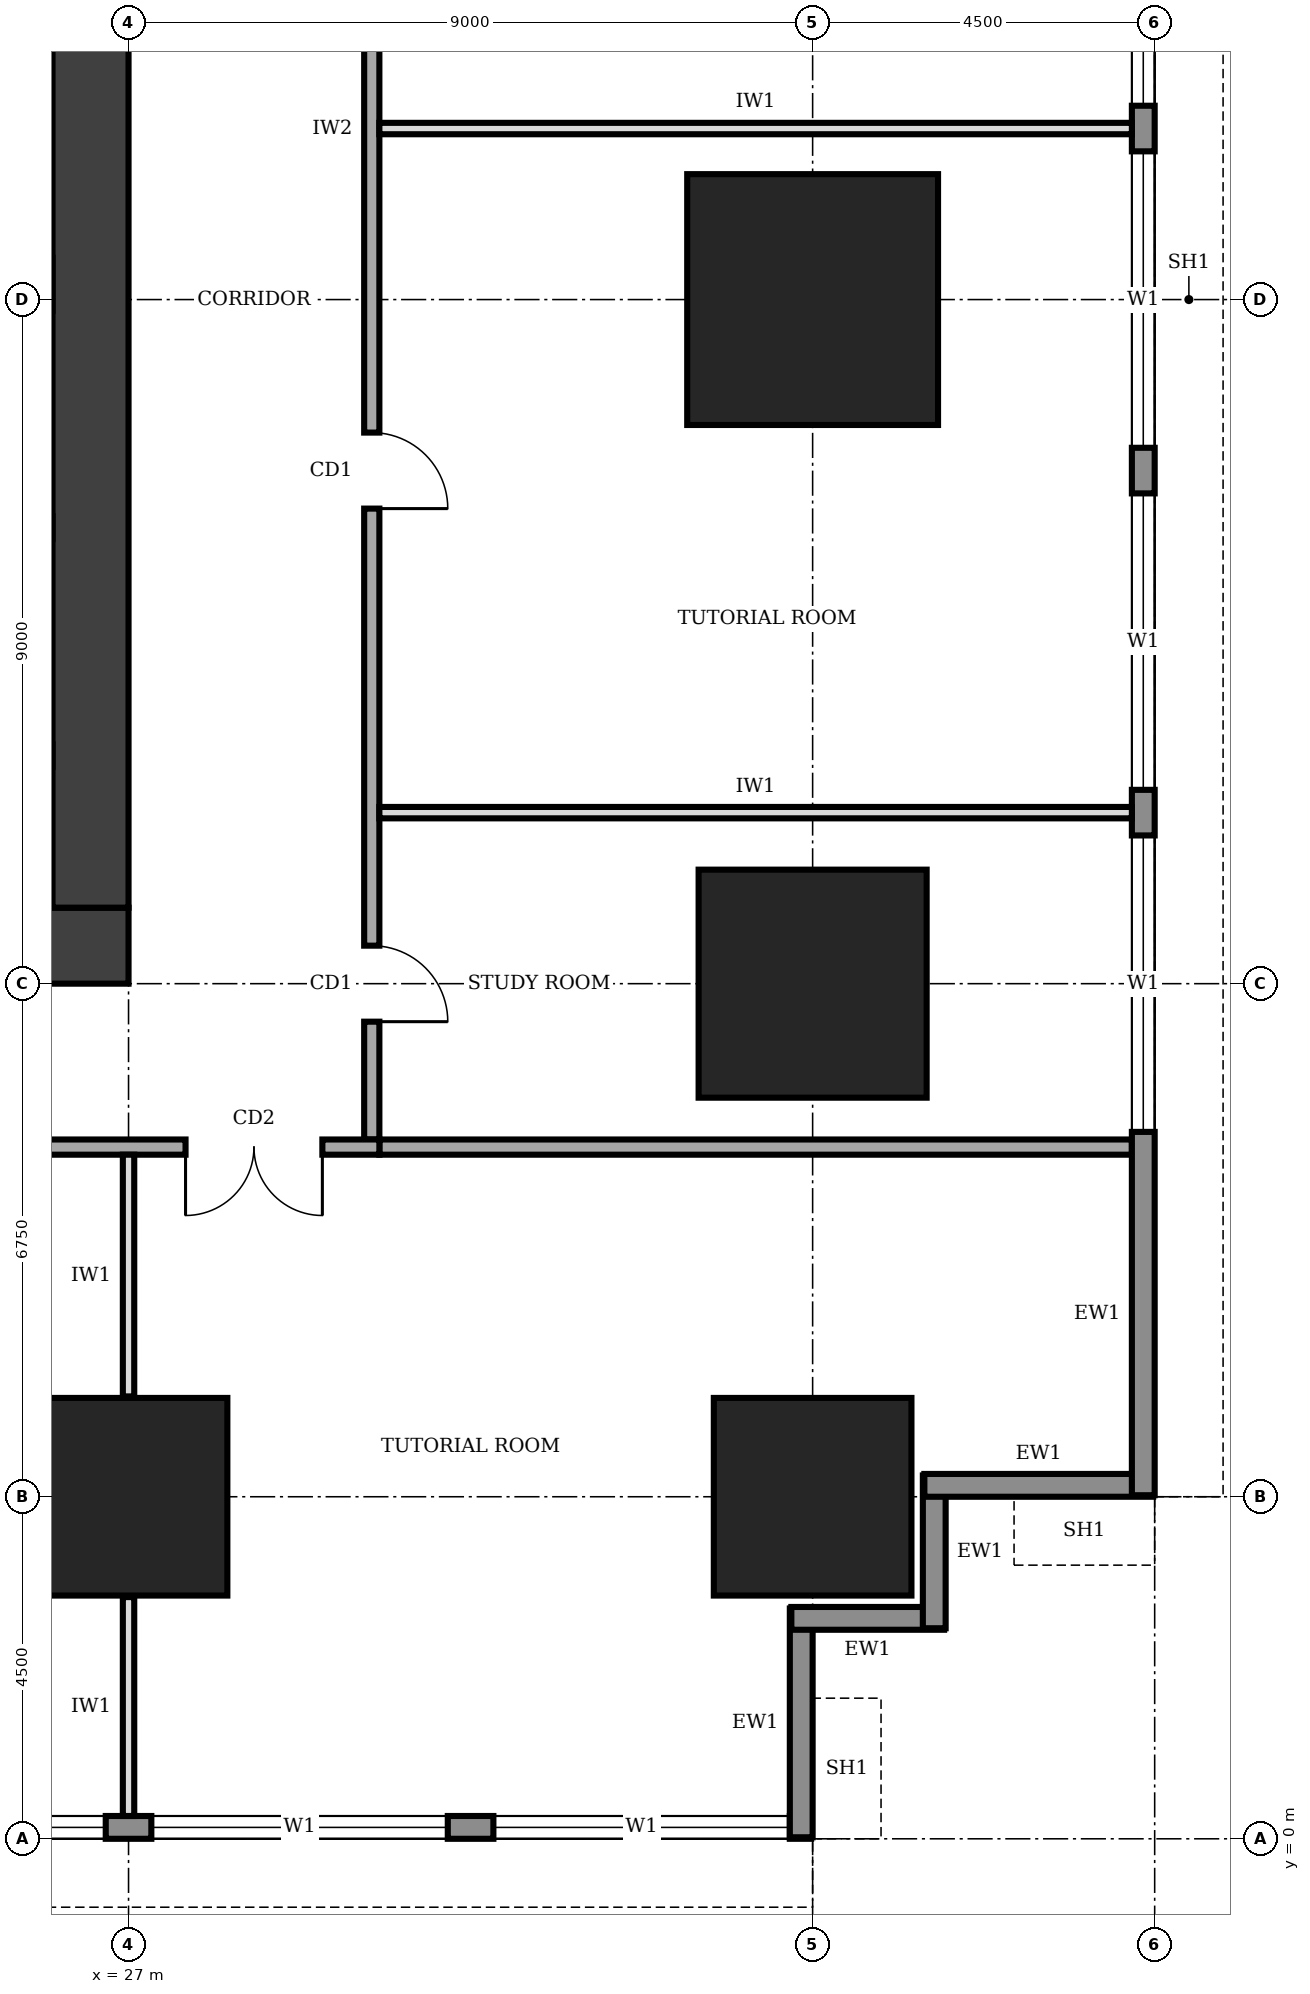
"""IFC4 building model, lengths in metres.
Left out: names, types, materials, properties, quantities, classifications, styles, units other than length and angle.
Written with IfcOpenShell. Run it as: python <this file> out.ifc"""

import sys

from ifc_helpers import new_model, si_unit, direction, frame, frame_2d, origin, origin_2d, place, context, subcontext, project, spatial, rectangle, extrude, element, fill, save


model = new_model("IFC4")
c1 = context("Model", 3, precision=1e-05, world=origin(), true_north=direction((0.0, 1.0)))
c2 = subcontext(c1, "Body", "Model", "MODEL_VIEW")
j1 = project(units=[si_unit("LENGTHUNIT", "METRE"), si_unit("PLANEANGLEUNIT", "RADIAN")], contexts=[c1])
p1 = place(None, origin())
s1 = spatial("IfcSite", under=j1, at=p1, CompositionType="ELEMENT")
p2 = place(p1, origin())
s2 = spatial("IfcBuilding", under=s1, at=p2, CompositionType="ELEMENT")
p3 = place(p2, frame((0.0, 0.0, 41.0)))
s3 = spatial("IfcBuildingStorey", under=s2, at=p3, CompositionType="ELEMENT", Elevation=41.0)
p4 = place(p3, frame((13.5, 11.75, 0.0), z_axis=(0.0, 0.0, 1.0), x_axis=(1.0, 0.0, 0.0)))
e1 = element("IfcWall", 1, at=p4, inside=s3, PredefinedType="SHEAR", context=c2, shape_type="SweptSolid", body=[
    extrude(rectangle(XDim=13.5, YDim=1.0, at=frame_2d((6.75, 0.0))), origin(), (0.0, 0.0, 1.0), 4.0),
])
p5 = place(p4, frame((4.75, 0.0, 0.0)))
e2 = element("IfcOpeningElement", 2, at=p5, cuts=e1, PredefinedType="OPENING", context=c2, shape_type="SweptSolid", body=[
    extrude(rectangle(XDim=1.0, YDim=2.1, at=frame_2d((0.5, 1.05))), frame((0.0, 0.51, 0.0), z_axis=(0.0, -1.0, 0.0), x_axis=(1.0, 0.0, 0.0)), (0.0, 0.0, 1.0), 1.02),
])
p6 = place(p3, frame((26.5, 12.25, 0.0), z_axis=(0.0, 0.0, 1.0), x_axis=(0.0, 1.0, 0.0)))
e3 = element("IfcWall", 3, at=p6, inside=s3, PredefinedType="SHEAR", context=c2, shape_type="SweptSolid", body=[
    extrude(rectangle(XDim=16.0, YDim=1.0, at=frame_2d((8.0, 0.0))), origin(), (0.0, 0.0, 1.0), 4.0),
])
for number, where, z_axis, x_axis in (
    (4, (27.0, 4.5, 0.0), (0.0, 0.0, 1.0), (1.0, 0.0, 0.0)),
    (5, (36.0, 4.5, 0.0), (0.0, 0.0, 1.0), (1.0, 0.0, 0.0)),
):
    element("IfcColumn", number, at=place(p3, frame(where, z_axis=z_axis, x_axis=x_axis)), inside=s3, PredefinedType="COLUMN", context=c2, shape_type="SweptSolid", body=[
        extrude(rectangle(XDim=2.6, YDim=2.6, at=origin_2d()), origin(), (0.0, 0.0, 1.0), 4.0),
    ])
p7 = place(p3, frame((36.0, 11.25, 0.0), z_axis=(0.0, 0.0, 1.0), x_axis=(1.0, 0.0, 0.0)))
e6 = element("IfcColumn", 6, at=p7, inside=s3, PredefinedType="COLUMN", context=c2, shape_type="SweptSolid", body=[
    extrude(rectangle(XDim=3.0, YDim=3.0, at=origin_2d()), origin(), (0.0, 0.0, 1.0), 4.0),
])
p8 = place(p3, frame((36.0, 20.25, 0.0), z_axis=(0.0, 0.0, 1.0), x_axis=(1.0, 0.0, 0.0)))
e7 = element("IfcColumn", 7, at=p8, inside=s3, PredefinedType="COLUMN", context=c2, shape_type="SweptSolid", body=[
    extrude(rectangle(XDim=3.3, YDim=3.3, at=origin_2d()), origin(), (0.0, 0.0, 1.0), 4.0),
])
p9 = place(p3, frame((4.52, 0.15, 0.0), z_axis=(0.0, 0.0, 1.0), x_axis=(1.0, 0.0, 0.0)))
e8 = element("IfcWall", 8, at=p9, inside=s3, PredefinedType="STANDARD", context=c2, shape_type="SweptSolid", body=[
    extrude(rectangle(XDim=31.46, YDim=0.3, at=frame_2d((15.73, 0.0))), origin(), (0.0, 0.0, 1.0), 3.75),
])
p10 = place(p9, frame((4.78, 0.0, 0.9)))
e9 = element("IfcOpeningElement", 9, at=p10, cuts=e8, PredefinedType="OPENING", context=c2, shape_type="SweptSolid", body=[
    extrude(rectangle(XDim=3.9, YDim=2.2, at=frame_2d((1.95, 1.1))), frame((0.0, 0.16, 0.0), z_axis=(0.0, -1.0, 0.0), x_axis=(1.0, 0.0, 0.0)), (0.0, 0.0, 1.0), 0.32),
])
p11 = place(p9, frame((9.28, 0.0, 0.9)))
e10 = element("IfcOpeningElement", 10, at=p11, cuts=e8, PredefinedType="OPENING", context=c2, shape_type="SweptSolid", body=[
    extrude(rectangle(XDim=3.9, YDim=2.2, at=frame_2d((1.95, 1.1))), frame((0.0, 0.16, 0.0), z_axis=(0.0, -1.0, 0.0), x_axis=(1.0, 0.0, 0.0)), (0.0, 0.0, 1.0), 0.32),
])
p12 = place(p9, frame((13.78, 0.0, 0.9)))
e11 = element("IfcOpeningElement", 11, at=p12, cuts=e8, PredefinedType="OPENING", context=c2, shape_type="SweptSolid", body=[
    extrude(rectangle(XDim=3.9, YDim=2.2, at=frame_2d((1.95, 1.1))), frame((0.0, 0.16, 0.0), z_axis=(0.0, -1.0, 0.0), x_axis=(1.0, 0.0, 0.0)), (0.0, 0.0, 1.0), 0.32),
])
p13 = place(p9, frame((18.28, 0.0, 0.9)))
e12 = element("IfcOpeningElement", 12, at=p13, cuts=e8, PredefinedType="OPENING", context=c2, shape_type="SweptSolid", body=[
    extrude(rectangle(XDim=3.9, YDim=2.2, at=frame_2d((1.95, 1.1))), frame((0.0, 0.16, 0.0), z_axis=(0.0, -1.0, 0.0), x_axis=(1.0, 0.0, 0.0)), (0.0, 0.0, 1.0), 0.32),
])
p14 = place(p9, frame((22.78, 0.0, 0.9)))
e13 = element("IfcOpeningElement", 13, at=p14, cuts=e8, PredefinedType="OPENING", context=c2, shape_type="SweptSolid", body=[
    extrude(rectangle(XDim=3.9, YDim=2.2, at=frame_2d((1.95, 1.1))), frame((0.0, 0.16, 0.0), z_axis=(0.0, -1.0, 0.0), x_axis=(1.0, 0.0, 0.0)), (0.0, 0.0, 1.0), 0.32),
])
p15 = place(p9, frame((27.28, 0.0, 0.9)))
e14 = element("IfcOpeningElement", 14, at=p15, cuts=e8, PredefinedType="OPENING", context=c2, shape_type="SweptSolid", body=[
    extrude(rectangle(XDim=3.9, YDim=2.2, at=frame_2d((1.95, 1.1))), frame((0.0, 0.16, 0.0), z_axis=(0.0, -1.0, 0.0), x_axis=(1.0, 0.0, 0.0)), (0.0, 0.0, 1.0), 0.32),
])
p16 = place(p3, frame((35.85, 0.02, 0.0), z_axis=(0.0, 0.0, 1.0), x_axis=(0.0, 1.0, 0.0)))
e15 = element("IfcWall", 15, at=p16, inside=s3, PredefinedType="STANDARD", context=c2, shape_type="SweptSolid", body=[
    extrude(rectangle(XDim=3.01, YDim=0.3, at=frame_2d((1.505, 0.0))), origin(), (0.0, 0.0, 1.0), 2.85),
])
for number, where, z_axis, x_axis in (
    (16, (35.72, 2.9, 0.0), (0.0, 0.0, 1.0), (1.0, 0.0, 0.0)),
    (17, (37.6, 2.77, 0.0), (0.0, 0.0, 1.0), (0.0, 1.0, 0.0)),
):
    element("IfcWall", number, at=place(p3, frame(where, z_axis=z_axis, x_axis=x_axis)), inside=s3, PredefinedType="STANDARD", context=c2, shape_type="SweptSolid", body=[
        extrude(rectangle(XDim=2.01, YDim=0.3, at=frame_2d((1.005, 0.0))), origin(), (0.0, 0.0, 1.0), 3.75),
    ])
p17 = place(p3, frame((37.47, 4.65, 0.0), z_axis=(0.0, 0.0, 1.0), x_axis=(1.0, 0.0, 0.0)))
e18 = element("IfcWall", 18, at=p17, inside=s3, PredefinedType="STANDARD", context=c2, shape_type="SweptSolid", body=[
    extrude(rectangle(XDim=3.01, YDim=0.3, at=frame_2d((1.505, 0.0))), origin(), (0.0, 0.0, 1.0), 2.85),
])
p18 = place(p3, frame((40.35, 4.52, 0.0), z_axis=(0.0, 0.0, 1.0), x_axis=(0.0, 1.0, 0.0)))
e19 = element("IfcWall", 19, at=p18, inside=s3, PredefinedType="STANDARD", context=c2, shape_type="SweptSolid", body=[
    extrude(rectangle(XDim=31.46, YDim=0.3, at=frame_2d((15.73, 0.0))), origin(), (0.0, 0.0, 1.0), 3.75),
])
p19 = place(p18, frame((4.78, 0.0, 0.9)))
e20 = element("IfcOpeningElement", 20, at=p19, cuts=e19, PredefinedType="OPENING", context=c2, shape_type="SweptSolid", body=[
    extrude(rectangle(XDim=3.9, YDim=2.2, at=frame_2d((1.95, 1.1))), frame((0.0, 0.16, 0.0), z_axis=(0.0, -1.0, 0.0), x_axis=(1.0, 0.0, 0.0)), (0.0, 0.0, 1.0), 0.32),
])
p20 = place(p18, frame((9.28, 0.0, 0.9)))
e21 = element("IfcOpeningElement", 21, at=p20, cuts=e19, PredefinedType="OPENING", context=c2, shape_type="SweptSolid", body=[
    extrude(rectangle(XDim=3.9, YDim=2.2, at=frame_2d((1.95, 1.1))), frame((0.0, 0.16, 0.0), z_axis=(0.0, -1.0, 0.0), x_axis=(1.0, 0.0, 0.0)), (0.0, 0.0, 1.0), 0.32),
])
p21 = place(p18, frame((13.78, 0.0, 0.9)))
e22 = element("IfcOpeningElement", 22, at=p21, cuts=e19, PredefinedType="OPENING", context=c2, shape_type="SweptSolid", body=[
    extrude(rectangle(XDim=3.9, YDim=2.2, at=frame_2d((1.95, 1.1))), frame((0.0, 0.16, 0.0), z_axis=(0.0, -1.0, 0.0), x_axis=(1.0, 0.0, 0.0)), (0.0, 0.0, 1.0), 0.32),
])
p22 = place(p18, frame((18.28, 0.0, 0.9)))
e23 = element("IfcOpeningElement", 23, at=p22, cuts=e19, PredefinedType="OPENING", context=c2, shape_type="SweptSolid", body=[
    extrude(rectangle(XDim=3.9, YDim=2.2, at=frame_2d((1.95, 1.1))), frame((0.0, 0.16, 0.0), z_axis=(0.0, -1.0, 0.0), x_axis=(1.0, 0.0, 0.0)), (0.0, 0.0, 1.0), 0.32),
])
p23 = place(p18, frame((22.78, 0.0, 0.9)))
e24 = element("IfcOpeningElement", 24, at=p23, cuts=e19, PredefinedType="OPENING", context=c2, shape_type="SweptSolid", body=[
    extrude(rectangle(XDim=3.9, YDim=2.2, at=frame_2d((1.95, 1.1))), frame((0.0, 0.16, 0.0), z_axis=(0.0, -1.0, 0.0), x_axis=(1.0, 0.0, 0.0)), (0.0, 0.0, 1.0), 0.32),
])
p24 = place(p18, frame((27.28, 0.0, 0.9)))
e25 = element("IfcOpeningElement", 25, at=p24, cuts=e19, PredefinedType="OPENING", context=c2, shape_type="SweptSolid", body=[
    extrude(rectangle(XDim=3.9, YDim=2.2, at=frame_2d((1.95, 1.1))), frame((0.0, 0.16, 0.0), z_axis=(0.0, -1.0, 0.0), x_axis=(1.0, 0.0, 0.0)), (0.0, 0.0, 1.0), 0.32),
])
p25 = place(p3, frame((11.9, 9.1, 0.0), z_axis=(0.0, 0.0, 1.0), x_axis=(1.0, 0.0, 0.0)))
e26 = element("IfcWall", 26, at=p25, inside=s3, PredefinedType="SOLIDWALL", context=c2, shape_type="SweptSolid", body=[
    extrude(rectangle(XDim=18.4, YDim=0.2, at=frame_2d((9.2, 0.0))), origin(), (0.0, 0.0, 1.0), 3.75),
])
p26 = place(p25, frame((0.275, 0.0, 0.0)))
e27 = element("IfcOpeningElement", 27, at=p26, cuts=e26, PredefinedType="OPENING", context=c2, shape_type="SweptSolid", body=[
    extrude(rectangle(XDim=1.0, YDim=2.1, at=frame_2d((0.5, 1.05))), frame((0.0, 0.11, 0.0), z_axis=(0.0, -1.0, 0.0), x_axis=(1.0, 0.0, 0.0)), (0.0, 0.0, 1.0), 0.22),
])
p27 = place(p25, frame((3.35, 0.0, 0.0)))
e28 = element("IfcOpeningElement", 28, at=p27, cuts=e26, PredefinedType="OPENING", context=c2, shape_type="SweptSolid", body=[
    extrude(rectangle(XDim=1.0, YDim=2.1, at=frame_2d((0.5, 1.05))), frame((0.0, 0.11, 0.0), z_axis=(0.0, -1.0, 0.0), x_axis=(1.0, 0.0, 0.0)), (0.0, 0.0, 1.0), 0.22),
])
p28 = place(p25, frame((10.1, 0.0, 0.0)))
e29 = element("IfcOpeningElement", 29, at=p28, cuts=e26, PredefinedType="OPENING", context=c2, shape_type="SweptSolid", body=[
    extrude(rectangle(XDim=1.0, YDim=2.1, at=frame_2d((0.5, 1.05))), frame((0.0, 0.11, 0.0), z_axis=(0.0, -1.0, 0.0), x_axis=(1.0, 0.0, 0.0)), (0.0, 0.0, 1.0), 0.22),
])
p29 = place(p25, frame((15.85, 0.0, 0.0)))
e30 = element("IfcOpeningElement", 30, at=p29, cuts=e26, PredefinedType="OPENING", context=c2, shape_type="SweptSolid", body=[
    extrude(rectangle(XDim=1.8, YDim=2.1, at=frame_2d((0.9, 1.05))), frame((0.0, 0.11, 0.0), z_axis=(0.0, -1.0, 0.0), x_axis=(1.0, 0.0, 0.0)), (0.0, 0.0, 1.0), 0.22),
])
p30 = place(p3, frame((30.2, 9.2, 0.0), z_axis=(0.0, 0.0, 1.0), x_axis=(0.0, 1.0, 0.0)))
e31 = element("IfcWall", 31, at=p30, inside=s3, PredefinedType="SOLIDWALL", context=c2, shape_type="SweptSolid", body=[
    extrude(rectangle(XDim=22.3, YDim=0.2, at=frame_2d((11.15, 0.0))), origin(), (0.0, 0.0, 1.0), 3.75),
])
p31 = place(p30, frame((1.55, 0.0, 0.0)))
e32 = element("IfcOpeningElement", 32, at=p31, cuts=e31, PredefinedType="OPENING", context=c2, shape_type="SweptSolid", body=[
    extrude(rectangle(XDim=1.0, YDim=2.1, at=frame_2d((0.5, 1.05))), frame((0.0, 0.11, 0.0), z_axis=(0.0, -1.0, 0.0), x_axis=(1.0, 0.0, 0.0)), (0.0, 0.0, 1.0), 0.22),
])
p32 = place(p30, frame((8.3, 0.0, 0.0)))
e33 = element("IfcOpeningElement", 33, at=p32, cuts=e31, PredefinedType="OPENING", context=c2, shape_type="SweptSolid", body=[
    extrude(rectangle(XDim=1.0, YDim=2.1, at=frame_2d((0.5, 1.05))), frame((0.0, 0.11, 0.0), z_axis=(0.0, -1.0, 0.0), x_axis=(1.0, 0.0, 0.0)), (0.0, 0.0, 1.0), 0.22),
])
p33 = place(p30, frame((17.3, 0.0, 0.0)))
e34 = element("IfcOpeningElement", 34, at=p33, cuts=e31, PredefinedType="OPENING", context=c2, shape_type="SweptSolid", body=[
    extrude(rectangle(XDim=1.0, YDim=2.1, at=frame_2d((0.5, 1.05))), frame((0.0, 0.11, 0.0), z_axis=(0.0, -1.0, 0.0), x_axis=(1.0, 0.0, 0.0)), (0.0, 0.0, 1.0), 0.22),
])
p34 = place(p3, frame((30.3, 9.1, 0.0), z_axis=(0.0, 0.0, 1.0), x_axis=(1.0, 0.0, 0.0)))
e35 = element("IfcWall", 35, at=p34, inside=s3, PredefinedType="SOLIDWALL", context=c2, shape_type="SweptSolid", body=[
    extrude(rectangle(XDim=9.9, YDim=0.2, at=frame_2d((4.95, 0.0))), origin(), (0.0, 0.0, 1.0), 3.75),
])
p35 = place(p3, frame((27.0, 0.3, 0.0), z_axis=(0.0, 0.0, 1.0), x_axis=(0.0, 1.0, 0.0)))
e36 = element("IfcWall", 36, at=p35, inside=s3, PredefinedType="PARTITIONING", context=c2, shape_type="SweptSolid", body=[
    extrude(rectangle(XDim=2.88, YDim=0.15, at=frame_2d((1.44, 0.0))), origin(), (0.0, 0.0, 1.0), 2.85),
])
p36 = place(p3, frame((27.0, 5.82, 0.0), z_axis=(0.0, 0.0, 1.0), x_axis=(0.0, 1.0, 0.0)))
e37 = element("IfcWall", 37, at=p36, inside=s3, PredefinedType="PARTITIONING", context=c2, shape_type="SweptSolid", body=[
    extrude(rectangle(XDim=3.18, YDim=0.15, at=frame_2d((1.59, 0.0))), origin(), (0.0, 0.0, 1.0), 2.85),
])
for number, where, z_axis, x_axis in (
    (38, (30.3, 13.5, 0.0), (0.0, 0.0, 1.0), (1.0, 0.0, 0.0)),
    (39, (30.3, 22.5, 0.0), (0.0, 0.0, 1.0), (1.0, 0.0, 0.0)),
):
    element("IfcWall", number, at=place(p3, frame(where, z_axis=z_axis, x_axis=x_axis)), inside=s3, PredefinedType="PARTITIONING", context=c2, shape_type="SweptSolid", body=[
        extrude(rectangle(XDim=9.9, YDim=0.15, at=frame_2d((4.95, 0.0))), origin(), (0.0, 0.0, 1.0), 3.75),
    ])
p37 = place(p13, origin())
e40 = element("IfcWindow", 40, at=p37, inside=s3, PartitioningType="SINGLE_PANEL", PredefinedType="WINDOW", context=c2, shape_type="SweptSolid", body=[
    extrude(rectangle(XDim=3.9, YDim=2.2, at=frame_2d((1.95, 1.1))), frame((0.0, 0.03, 0.0), z_axis=(0.0, -1.0, 0.0), x_axis=(1.0, 0.0, 0.0)), (0.0, 0.0, 1.0), 0.06),
])
fill(e12, e40)
p38 = place(p14, origin())
e41 = element("IfcWindow", 41, at=p38, inside=s3, PartitioningType="SINGLE_PANEL", PredefinedType="WINDOW", context=c2, shape_type="SweptSolid", body=[
    extrude(rectangle(XDim=3.9, YDim=2.2, at=frame_2d((1.95, 1.1))), frame((0.0, 0.03, 0.0), z_axis=(0.0, -1.0, 0.0), x_axis=(1.0, 0.0, 0.0)), (0.0, 0.0, 1.0), 0.06),
])
fill(e13, e41)
p39 = place(p15, origin())
e42 = element("IfcWindow", 42, at=p39, inside=s3, PartitioningType="SINGLE_PANEL", PredefinedType="WINDOW", context=c2, shape_type="SweptSolid", body=[
    extrude(rectangle(XDim=3.9, YDim=2.2, at=frame_2d((1.95, 1.1))), frame((0.0, 0.03, 0.0), z_axis=(0.0, -1.0, 0.0), x_axis=(1.0, 0.0, 0.0)), (0.0, 0.0, 1.0), 0.06),
])
fill(e14, e42)
p40 = place(p19, origin())
e43 = element("IfcWindow", 43, at=p40, inside=s3, PartitioningType="SINGLE_PANEL", PredefinedType="WINDOW", context=c2, shape_type="SweptSolid", body=[
    extrude(rectangle(XDim=3.9, YDim=2.2, at=frame_2d((1.95, 1.1))), frame((0.0, 0.03, 0.0), z_axis=(0.0, -1.0, 0.0), x_axis=(1.0, 0.0, 0.0)), (0.0, 0.0, 1.0), 0.06),
])
fill(e20, e43)
p41 = place(p20, origin())
e44 = element("IfcWindow", 44, at=p41, inside=s3, PartitioningType="SINGLE_PANEL", PredefinedType="WINDOW", context=c2, shape_type="SweptSolid", body=[
    extrude(rectangle(XDim=3.9, YDim=2.2, at=frame_2d((1.95, 1.1))), frame((0.0, 0.03, 0.0), z_axis=(0.0, -1.0, 0.0), x_axis=(1.0, 0.0, 0.0)), (0.0, 0.0, 1.0), 0.06),
])
fill(e21, e44)
p42 = place(p21, origin())
e45 = element("IfcWindow", 45, at=p42, inside=s3, PartitioningType="SINGLE_PANEL", PredefinedType="WINDOW", context=c2, shape_type="SweptSolid", body=[
    extrude(rectangle(XDim=3.9, YDim=2.2, at=frame_2d((1.95, 1.1))), frame((0.0, 0.03, 0.0), z_axis=(0.0, -1.0, 0.0), x_axis=(1.0, 0.0, 0.0)), (0.0, 0.0, 1.0), 0.06),
])
fill(e22, e45)
p43 = place(p22, origin())
e46 = element("IfcWindow", 46, at=p43, inside=s3, PartitioningType="SINGLE_PANEL", PredefinedType="WINDOW", context=c2, shape_type="SweptSolid", body=[
    extrude(rectangle(XDim=3.9, YDim=2.2, at=frame_2d((1.95, 1.1))), frame((0.0, 0.03, 0.0), z_axis=(0.0, -1.0, 0.0), x_axis=(1.0, 0.0, 0.0)), (0.0, 0.0, 1.0), 0.06),
])
fill(e23, e46)
p44 = place(p29, frame((1.8, 0.0, 0.0), z_axis=(0.0, 0.0, 1.0), x_axis=(-1.0, 0.0, 0.0)))
e47 = element("IfcDoor", 47, at=p44, inside=s3, OperationType="DOUBLE_DOOR_SINGLE_SWING", PredefinedType="DOOR", context=c2, shape_type="SweptSolid", body=[
    extrude(rectangle(XDim=1.8, YDim=2.1, at=frame_2d((0.9, 1.05))), frame((0.0, 0.025, 0.0), z_axis=(0.0, -1.0, 0.0), x_axis=(1.0, 0.0, 0.0)), (0.0, 0.0, 1.0), 0.05),
])
fill(e30, e47)
p45 = place(p31, frame((1.0, 0.0, 0.0), z_axis=(0.0, 0.0, 1.0), x_axis=(-1.0, 0.0, 0.0)))
e48 = element("IfcDoor", 48, at=p45, inside=s3, OperationType="SINGLE_SWING_RIGHT", PredefinedType="DOOR", context=c2, shape_type="SweptSolid", body=[
    extrude(rectangle(XDim=1.0, YDim=2.1, at=frame_2d((0.5, 1.05))), frame((0.0, 0.025, 0.0), z_axis=(0.0, -1.0, 0.0), x_axis=(1.0, 0.0, 0.0)), (0.0, 0.0, 1.0), 0.05),
])
fill(e32, e48)
p46 = place(p32, frame((1.0, 0.0, 0.0), z_axis=(0.0, 0.0, 1.0), x_axis=(-1.0, 0.0, 0.0)))
e49 = element("IfcDoor", 49, at=p46, inside=s3, OperationType="SINGLE_SWING_RIGHT", PredefinedType="DOOR", context=c2, shape_type="SweptSolid", body=[
    extrude(rectangle(XDim=1.0, YDim=2.1, at=frame_2d((0.5, 1.05))), frame((0.0, 0.025, 0.0), z_axis=(0.0, -1.0, 0.0), x_axis=(1.0, 0.0, 0.0)), (0.0, 0.0, 1.0), 0.05),
])
fill(e33, e49)
save(model, sys.argv[1])
